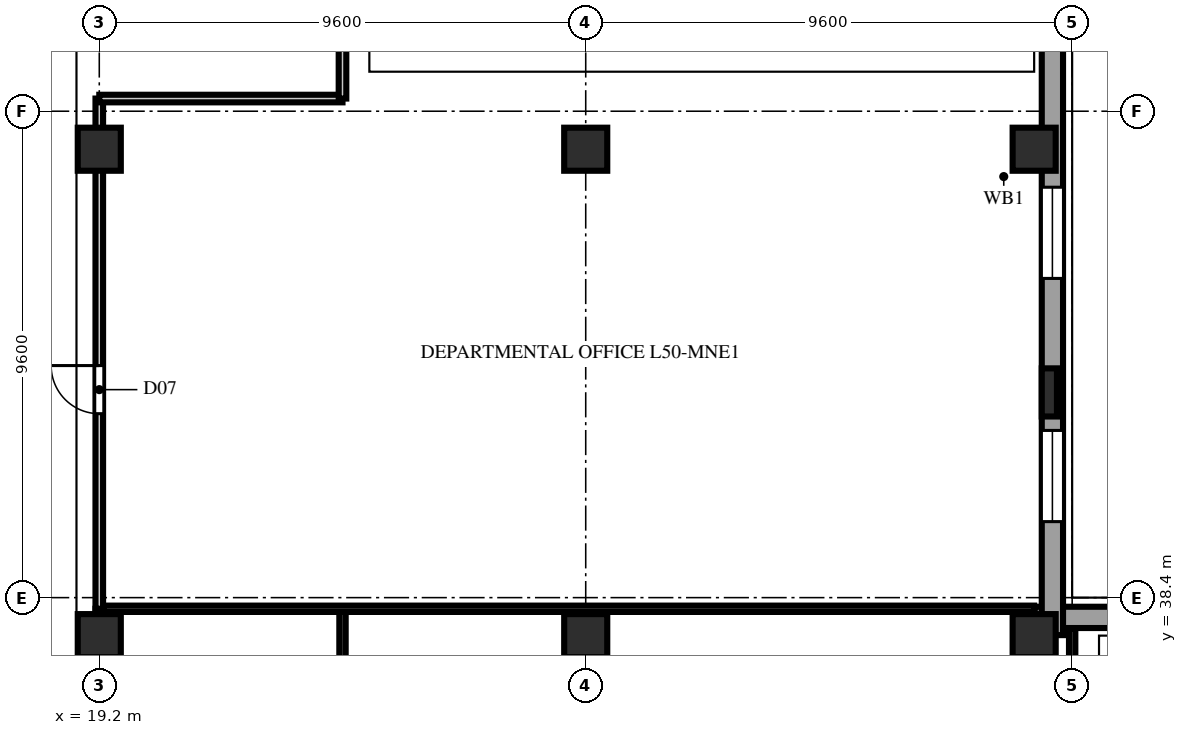
"""IFC4 building model, lengths in metres.
Left out: names, types, materials, properties, quantities, classifications, styles, units other than length and angle.
Written with IfcOpenShell. Run it as: python <this file> out.ifc"""

import sys

from ifc_helpers import new_model, si_unit, direction, frame, frame_2d, origin, origin_2d, place, context, subcontext, project, spatial, rectangle, extrude, element, fill, save


model = new_model("IFC4")
c1 = context("Model", 3, precision=1e-05, world=origin(), true_north=direction((0.0, 1.0)))
c2 = subcontext(c1, "Body", "Model", "MODEL_VIEW")
j1 = project(units=[si_unit("LENGTHUNIT", "METRE"), si_unit("PLANEANGLEUNIT", "RADIAN")], contexts=[c1])
p1 = place(None, origin())
s1 = spatial("IfcSite", under=j1, at=p1, CompositionType="ELEMENT")
p2 = place(p1, origin())
s2 = spatial("IfcBuilding", under=s1, at=p2, CompositionType="ELEMENT")
p3 = place(p2, frame((0.0, 0.0, 199.0)))
s3 = spatial("IfcBuildingStorey", under=s2, at=p3, CompositionType="ELEMENT", Elevation=199.0)
for number, where, z_axis, x_axis in (
    (1, (19.2, 37.65, 0.0), (0.0, 0.0, 1.0), (1.0, 0.0, 0.0)),
    (2, (19.2, 47.25, 0.0), (0.0, 0.0, 1.0), (1.0, 0.0, 0.0)),
    (3, (28.8, 37.65, 0.0), (0.0, 0.0, 1.0), (1.0, 0.0, 0.0)),
    (4, (28.8, 47.25, 0.0), (0.0, 0.0, 1.0), (1.0, 0.0, 0.0)),
    (5, (37.65, 37.65, 0.0), (0.0, 0.0, 1.0), (1.0, 0.0, 0.0)),
    (6, (37.65, 47.25, 0.0), (0.0, 0.0, 1.0), (1.0, 0.0, 0.0)),
):
    element("IfcColumn", number, at=place(p3, frame(where, z_axis=z_axis, x_axis=x_axis)), inside=s3, PredefinedType="COLUMN", context=c2, shape_type="SweptSolid", body=[
        extrude(rectangle(XDim=0.85, YDim=0.85, at=origin_2d()), origin(), (0.0, 0.0, 1.0), 3.8),
    ])
p4 = place(p3, frame((37.95, 42.45, 0.0), z_axis=(0.0, 0.0, 1.0), x_axis=(0.0, 1.0, 0.0)))
e7 = element("IfcColumn", 7, at=p4, inside=s3, PredefinedType="PILASTER", context=c2, shape_type="SweptSolid", body=[
    extrude(rectangle(XDim=0.95, YDim=0.3, at=origin_2d()), origin(), (0.0, 0.0, 1.0), 3.8),
])
p5 = place(p3, frame((55.76, 38.01, 0.0), z_axis=(0.0, 0.0, 1.0), x_axis=(-1.0, 0.0, 0.0)))
e8 = element("IfcWall", 8, at=p5, inside=s3, PredefinedType="SOLIDWALL", context=c2, shape_type="SweptSolid", body=[
    extrude(rectangle(XDim=18.1, YDim=0.42, at=frame_2d((9.05, 0.0))), origin(), (0.0, 0.0, 1.0), 3.54),
])
p6 = place(p5, frame((4.46, 0.0, 0.85)))
e9 = element("IfcOpeningElement", 9, at=p6, cuts=e8, PredefinedType="OPENING", context=c2, shape_type="SweptSolid", body=[
    extrude(rectangle(XDim=1.8, YDim=1.85, at=frame_2d((0.9, 0.925))), frame((0.0, 0.222, 0.0), z_axis=(0.0, -1.0, 0.0), x_axis=(1.0, 0.0, 0.0)), (0.0, 0.0, 1.0), 0.444),
])
p7 = place(p5, frame((9.26, 0.0, 0.85)))
e10 = element("IfcOpeningElement", 10, at=p7, cuts=e8, PredefinedType="OPENING", context=c2, shape_type="SweptSolid", body=[
    extrude(rectangle(XDim=1.8, YDim=1.85, at=frame_2d((0.9, 0.925))), frame((0.0, 0.222, 0.0), z_axis=(0.0, -1.0, 0.0), x_axis=(1.0, 0.0, 0.0)), (0.0, 0.0, 1.0), 0.444),
])
p8 = place(p5, frame((14.06, 0.0, 0.85)))
e11 = element("IfcOpeningElement", 11, at=p8, cuts=e8, PredefinedType="OPENING", context=c2, shape_type="SweptSolid", body=[
    extrude(rectangle(XDim=1.8, YDim=1.85, at=frame_2d((0.9, 0.925))), frame((0.0, 0.222, 0.0), z_axis=(0.0, -1.0, 0.0), x_axis=(1.0, 0.0, 0.0)), (0.0, 0.0, 1.0), 0.444),
])
p9 = place(p3, frame((38.01, 37.66, 0.0), z_axis=(0.0, 0.0, 1.0), x_axis=(0.0, 1.0, 0.0)))
e12 = element("IfcWall", 12, at=p9, inside=s3, PredefinedType="SOLIDWALL", context=c2, shape_type="SweptSolid", body=[
    extrude(rectangle(XDim=18.1, YDim=0.42, at=frame_2d((9.05, 0.0))), origin(), (0.0, 0.0, 1.0), 3.54),
])
p10 = place(p9, frame((2.24, 0.0, 0.85)))
e13 = element("IfcOpeningElement", 13, at=p10, cuts=e12, PredefinedType="OPENING", context=c2, shape_type="SweptSolid", body=[
    extrude(rectangle(XDim=1.8, YDim=1.85, at=frame_2d((0.9, 0.925))), frame((0.0, 0.222, 0.0), z_axis=(0.0, -1.0, 0.0), x_axis=(1.0, 0.0, 0.0)), (0.0, 0.0, 1.0), 0.444),
])
p11 = place(p9, frame((7.04, 0.0, 0.85)))
e14 = element("IfcOpeningElement", 14, at=p11, cuts=e12, PredefinedType="OPENING", context=c2, shape_type="SweptSolid", body=[
    extrude(rectangle(XDim=1.8, YDim=1.85, at=frame_2d((0.9, 0.925))), frame((0.0, 0.222, 0.0), z_axis=(0.0, -1.0, 0.0), x_axis=(1.0, 0.0, 0.0)), (0.0, 0.0, 1.0), 0.444),
])
p12 = place(p9, frame((11.84, 0.0, 0.85)))
e15 = element("IfcOpeningElement", 15, at=p12, cuts=e12, PredefinedType="OPENING", context=c2, shape_type="SweptSolid", body=[
    extrude(rectangle(XDim=1.8, YDim=1.85, at=frame_2d((0.9, 0.925))), frame((0.0, 0.222, 0.0), z_axis=(0.0, -1.0, 0.0), x_axis=(1.0, 0.0, 0.0)), (0.0, 0.0, 1.0), 0.444),
])
p13 = place(p3, frame((24.0, 23.7, 0.0), z_axis=(0.0, 0.0, 1.0), x_axis=(0.0, 1.0, 0.0)))
e16 = element("IfcWall", 16, at=p13, inside=s3, PredefinedType="PARTITIONING", context=c2, shape_type="SweptSolid", body=[
    extrude(rectangle(XDim=14.48, YDim=0.125, at=frame_2d((7.24, 0.0))), origin(), (0.0, 0.0, 1.0), 3.007),
])
p14 = place(p3, frame((38.4, 23.7, 0.0), z_axis=(0.0, 0.0, 1.0), x_axis=(0.0, 1.0, 0.0)))
e17 = element("IfcWall", 17, at=p14, inside=s3, PredefinedType="PARTITIONING", context=c2, shape_type="SweptSolid", body=[
    extrude(rectangle(XDim=14.09, YDim=0.125, at=frame_2d((7.045, 0.0))), origin(), (0.0, 0.0, 1.0), 3.54),
])
p15 = place(p3, frame((19.2, 23.7, 0.0), z_axis=(0.0, 0.0, 1.0), x_axis=(0.0, 1.0, 0.0)))
e18 = element("IfcWall", 18, at=p15, inside=s3, PredefinedType="PARTITIONING", context=c2, shape_type="SweptSolid", body=[
    extrude(rectangle(XDim=14.48, YDim=0.15, at=frame_2d((7.24, 0.0))), origin(), (0.0, 0.0, 1.0), 2.996),
])
p16 = place(p3, frame((19.28, 38.18, 0.0), z_axis=(0.0, 0.0, 1.0), x_axis=(1.0, 0.0, 0.0)))
e19 = element("IfcWall", 19, at=p16, inside=s3, PredefinedType="PARTITIONING", context=c2, shape_type="SweptSolid", body=[
    extrude(rectangle(XDim=18.37, YDim=0.125, at=frame_2d((9.185, 0.0))), origin(), (0.0, 0.0, 1.0), 3.54),
])
p17 = place(p3, frame((19.2, 38.18, 0.0), z_axis=(0.0, 0.0, 1.0), x_axis=(0.0, 1.0, 0.0)))
e20 = element("IfcWall", 20, at=p17, inside=s3, PredefinedType="PARTITIONING", context=c2, shape_type="SweptSolid", body=[
    extrude(rectangle(XDim=10.07, YDim=0.15, at=frame_2d((5.035, 0.0))), origin(), (0.0, 0.0, 1.0), 2.996),
])
p18 = place(p17, frame((3.85, 0.0, 0.0)))
e21 = element("IfcOpeningElement", 21, at=p18, cuts=e20, PredefinedType="OPENING", context=c2, shape_type="SweptSolid", body=[
    extrude(rectangle(XDim=0.95, YDim=2.15, at=frame_2d((0.475, 1.075))), frame((0.0, 0.087, 0.0), z_axis=(0.0, -1.0, 0.0), x_axis=(1.0, 0.0, 0.0)), (0.0, 0.0, 1.0), 0.174),
])
p19 = place(p3, frame((19.2, 48.25, 0.0), z_axis=(0.0, 0.0, 1.0), x_axis=(1.0, 0.0, 0.0)))
e22 = element("IfcWall", 22, at=p19, inside=s3, PredefinedType="PARTITIONING", context=c2, shape_type="SweptSolid", body=[
    extrude(rectangle(XDim=4.8, YDim=0.15, at=frame_2d((2.4, 0.0))), origin(), (0.0, 0.0, 1.0), 3.54),
])
p20 = place(p3, frame((24.0, 48.25, 0.0), z_axis=(0.0, 0.0, 1.0), x_axis=(0.0, 1.0, 0.0)))
e23 = element("IfcWall", 23, at=p20, inside=s3, PredefinedType="PARTITIONING", context=c2, shape_type="SweptSolid", body=[
    extrude(rectangle(XDim=8.494, YDim=0.15, at=frame_2d((4.247, 0.0))), origin(), (0.0, 0.0, 1.0), 3.007),
])
p21 = place(p20, frame((2.9, 0.0, 0.0)))
e24 = element("IfcOpeningElement", 24, at=p21, cuts=e23, PredefinedType="OPENING", context=c2, shape_type="SweptSolid", body=[
    extrude(rectangle(XDim=1.0, YDim=2.2, at=frame_2d((0.5, 1.1))), frame((0.0, 0.087, 0.0), z_axis=(0.0, -1.0, 0.0), x_axis=(1.0, 0.0, 0.0)), (0.0, 0.0, 1.0), 0.174),
])
p22 = place(p10, origin())
e25 = element("IfcWindow", 25, at=p22, inside=s3, PartitioningType="DOUBLE_PANEL_VERTICAL", PredefinedType="WINDOW", context=c2, shape_type="SweptSolid", body=[
    extrude(rectangle(XDim=1.8, YDim=1.85, at=frame_2d((0.9, 0.925))), frame((0.0, 0.11, 0.0), z_axis=(0.0, -1.0, 0.0), x_axis=(1.0, 0.0, 0.0)), (0.0, 0.0, 1.0), 0.06),
])
fill(e13, e25)
p23 = place(p11, origin())
e26 = element("IfcWindow", 26, at=p23, inside=s3, PartitioningType="DOUBLE_PANEL_VERTICAL", PredefinedType="WINDOW", context=c2, shape_type="SweptSolid", body=[
    extrude(rectangle(XDim=1.8, YDim=1.85, at=frame_2d((0.9, 0.925))), frame((0.0, 0.11, 0.0), z_axis=(0.0, -1.0, 0.0), x_axis=(1.0, 0.0, 0.0)), (0.0, 0.0, 1.0), 0.06),
])
fill(e14, e26)
p24 = place(p18, origin())
e27 = element("IfcDoor", 27, at=p24, inside=s3, OperationType="SINGLE_SWING_RIGHT", PredefinedType="DOOR", context=c2, shape_type="SweptSolid", body=[
    extrude(rectangle(XDim=0.95, YDim=2.15, at=frame_2d((0.475, 1.075))), frame((0.0, 0.025, 0.0), z_axis=(0.0, -1.0, 0.0), x_axis=(1.0, 0.0, 0.0)), (0.0, 0.0, 1.0), 0.05),
])
fill(e21, e27)
save(model, sys.argv[1])
